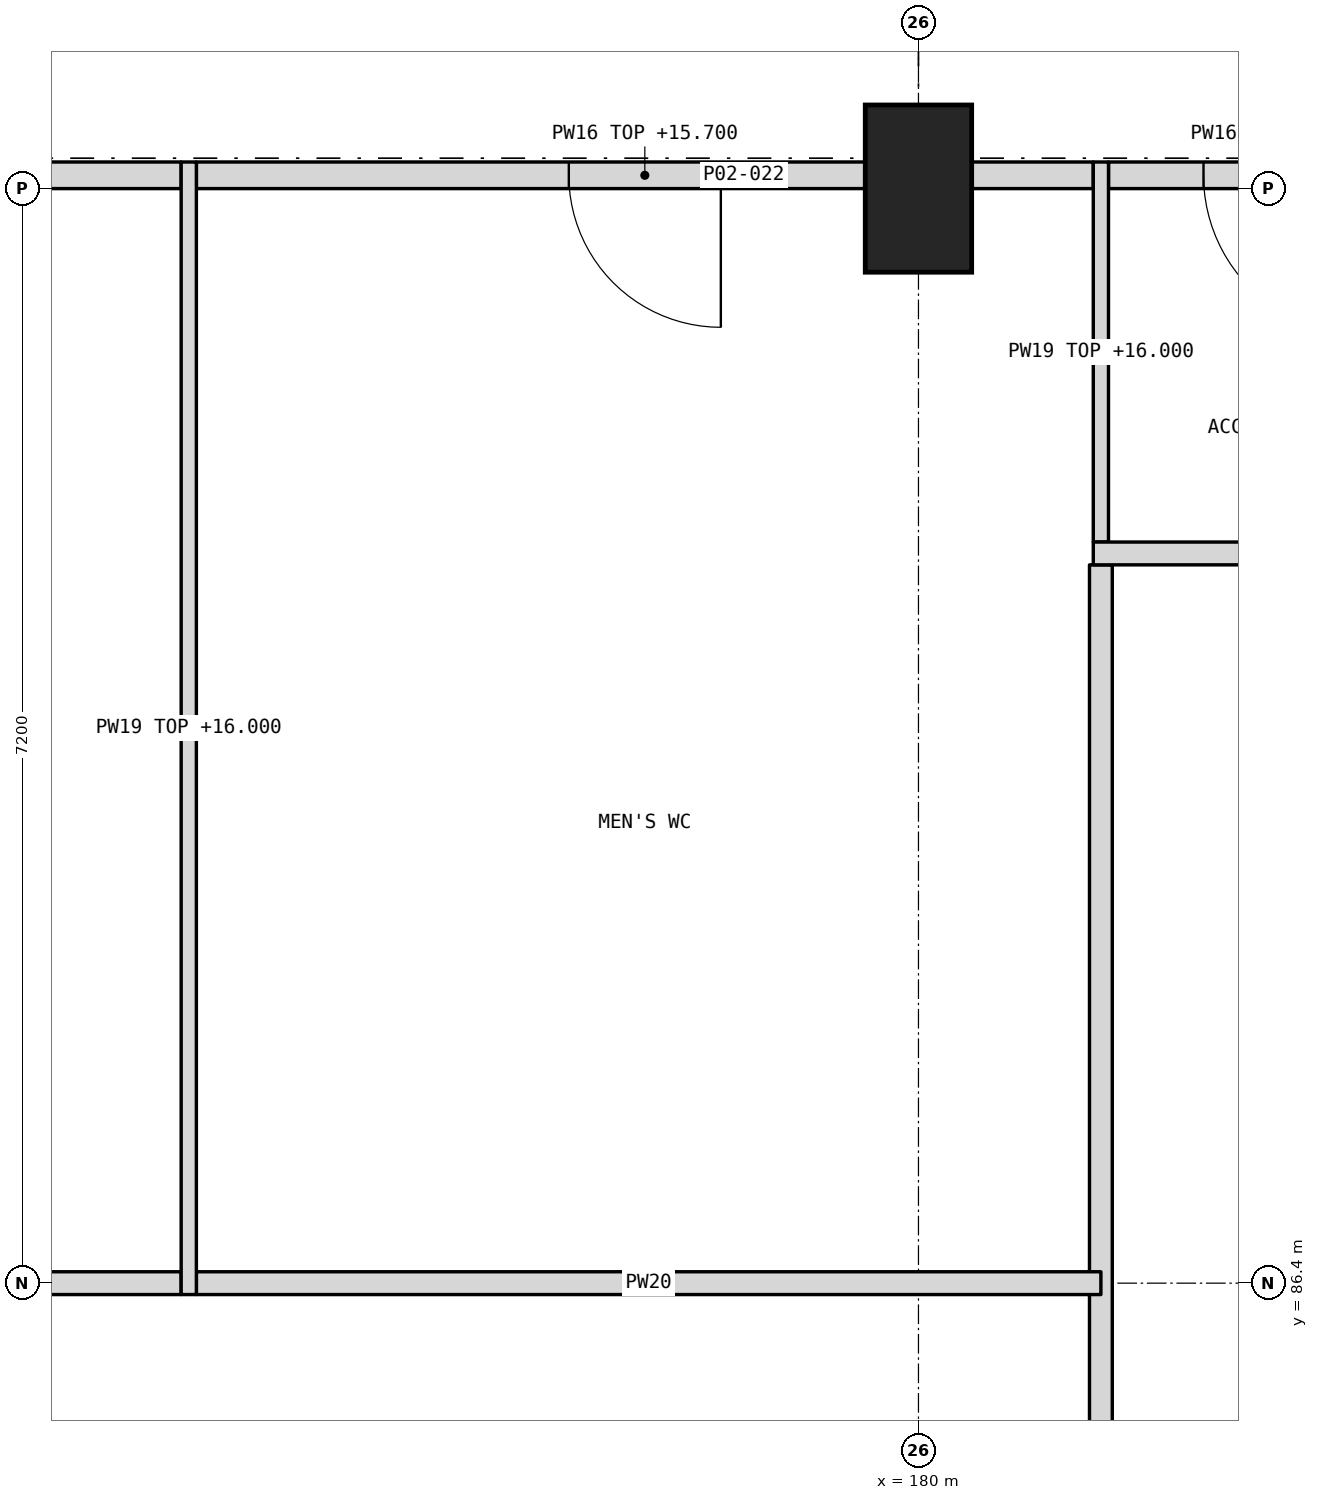
"""IFC4 building model, lengths in metres.
Left out: names, types, materials, properties, quantities, classifications, styles, units other than length and angle.
Written with IfcOpenShell. Run it as: python <this file> out.ifc"""

import sys

from ifc_helpers import new_model, si_unit, direction, frame, frame_2d, origin, origin_2d, place, context, subcontext, project, spatial, rectangle, extrude, element, fill, save


model = new_model("IFC4")
c1 = context("Model", 3, precision=1e-05, world=origin(), true_north=direction((0.0, 1.0)))
c2 = subcontext(c1, "Body", "Model", "MODEL_VIEW")
j1 = project(units=[si_unit("LENGTHUNIT", "METRE"), si_unit("PLANEANGLEUNIT", "RADIAN")], contexts=[c1])
p1 = place(None, origin())
s1 = spatial("IfcSite", under=j1, at=p1, CompositionType="ELEMENT")
p2 = place(p1, origin())
s2 = spatial("IfcBuilding", under=s1, at=p2, CompositionType="ELEMENT")
p3 = place(p2, frame((0.0, 0.0, 12.0)))
s3 = spatial("IfcBuildingStorey", under=s2, at=p3, CompositionType="ELEMENT", Elevation=12.0)
p4 = place(p3, frame((180.0, 93.6, 0.0), z_axis=(0.0, 0.0, 1.0), x_axis=(1.0, 0.0, 0.0)))
e1 = element("IfcColumn", 1, at=p4, inside=s3, PredefinedType="COLUMN", context=c2, shape_type="SweptSolid", body=[
    extrude(rectangle(XDim=0.7, YDim=1.1, at=origin_2d()), origin(), (0.0, 0.0, 1.0), 4.5),
])
p5 = place(p3, frame((169.2, 93.688, 0.0), z_axis=(0.0, 0.0, 1.0), x_axis=(1.0, 0.0, 0.0)))
e2 = element("IfcWall", 2, at=p5, inside=s3, PredefinedType="PARTITIONING", context=c2, shape_type="SweptSolid", body=[
    extrude(rectangle(XDim=5.95, YDim=0.175, at=frame_2d((2.975, 0.0))), origin(), (0.0, 0.0, 1.0), 3.7),
])
p6 = place(p5, frame((2.1, 0.0, 0.0)))
e3 = element("IfcOpeningElement", 3, at=p6, cuts=e2, PredefinedType="OPENING", context=c2, shape_type="SweptSolid", body=[
    extrude(rectangle(XDim=1.0, YDim=2.1, at=frame_2d((0.5, 1.05))), frame((0.0, 0.097, 0.0), z_axis=(0.0, -1.0, 0.0), x_axis=(1.0, 0.0, 0.0)), (0.0, 0.0, 1.0), 0.195),
])
p7 = place(p3, frame((175.25, 93.688, 0.0), z_axis=(0.0, 0.0, 1.0), x_axis=(1.0, 0.0, 0.0)))
e4 = element("IfcWall", 4, at=p7, inside=s3, PredefinedType="PARTITIONING", context=c2, shape_type="SweptSolid", body=[
    extrude(rectangle(XDim=5.9, YDim=0.175, at=frame_2d((2.95, 0.0))), origin(), (0.0, 0.0, 1.0), 3.7),
])
p8 = place(p7, frame((2.45, 0.0, 0.0)))
e5 = element("IfcOpeningElement", 5, at=p8, cuts=e4, PredefinedType="OPENING", context=c2, shape_type="SweptSolid", body=[
    extrude(rectangle(XDim=1.0, YDim=2.1, at=frame_2d((0.5, 1.05))), frame((0.0, 0.097, 0.0), z_axis=(0.0, -1.0, 0.0), x_axis=(1.0, 0.0, 0.0)), (0.0, 0.0, 1.0), 0.195),
])
p9 = place(p3, frame((181.25, 93.688, 0.0), z_axis=(0.0, 0.0, 1.0), x_axis=(1.0, 0.0, 0.0)))
e6 = element("IfcWall", 6, at=p9, inside=s3, PredefinedType="PARTITIONING", context=c2, shape_type="SweptSolid", body=[
    extrude(rectangle(XDim=2.3, YDim=0.175, at=frame_2d((1.15, 0.0))), origin(), (0.0, 0.0, 1.0), 3.7),
])
p10 = place(p9, frame((0.625, 0.0, 0.0)))
e7 = element("IfcOpeningElement", 7, at=p10, cuts=e6, PredefinedType="OPENING", context=c2, shape_type="SweptSolid", body=[
    extrude(rectangle(XDim=1.05, YDim=2.1, at=frame_2d((0.525, 1.05))), frame((0.0, 0.097, 0.0), z_axis=(0.0, -1.0, 0.0), x_axis=(1.0, 0.0, 0.0)), (0.0, 0.0, 1.0), 0.195),
])
p11 = place(p3, frame((181.2, 79.288, 0.0), z_axis=(0.0, 0.0, 1.0), x_axis=(0.0, 1.0, 0.0)))
e8 = element("IfcWall", 8, at=p11, inside=s3, PredefinedType="PARTITIONING", context=c2, shape_type="SweptSolid", body=[
    extrude(rectangle(XDim=11.837, YDim=0.15, at=frame_2d((5.919, 0.0))), origin(), (0.0, 0.0, 1.0), 4.0),
])
p12 = place(p3, frame((181.2, 91.275, 0.0), z_axis=(0.0, 0.0, 1.0), x_axis=(0.0, 1.0, 0.0)))
e9 = element("IfcWall", 9, at=p12, inside=s3, PredefinedType="PARTITIONING", context=c2, shape_type="SweptSolid", body=[
    extrude(rectangle(XDim=2.5, YDim=0.1, at=frame_2d((1.25, 0.0))), origin(), (0.0, 0.0, 1.0), 4.0),
])
for number, where, z_axis, x_axis in (
    (10, (169.2, 86.4, 0.0), (0.0, 0.0, 1.0), (1.0, 0.0, 0.0)),
    (11, (175.25, 86.4, 0.0), (0.0, 0.0, 1.0), (1.0, 0.0, 0.0)),
):
    element("IfcWall", number, at=place(p3, frame(where, z_axis=z_axis, x_axis=x_axis)), inside=s3, PredefinedType="PARTITIONING", context=c2, shape_type="SweptSolid", body=[
        extrude(rectangle(XDim=5.95, YDim=0.15, at=frame_2d((2.975, 0.0))), origin(), (0.0, 0.0, 1.0), 4.0),
    ])
p13 = place(p3, frame((181.15, 91.2, 0.0), z_axis=(0.0, 0.0, 1.0), x_axis=(1.0, 0.0, 0.0)))
e12 = element("IfcWall", 12, at=p13, inside=s3, PredefinedType="PARTITIONING", context=c2, shape_type="SweptSolid", body=[
    extrude(rectangle(XDim=2.4, YDim=0.15, at=frame_2d((1.2, 0.0))), origin(), (0.0, 0.0, 1.0), 4.0),
])
p14 = place(p3, frame((175.2, 86.325, 0.0), z_axis=(0.0, 0.0, 1.0), x_axis=(0.0, 1.0, 0.0)))
e13 = element("IfcWall", 13, at=p14, inside=s3, PredefinedType="PARTITIONING", context=c2, shape_type="SweptSolid", body=[
    extrude(rectangle(XDim=7.45, YDim=0.1, at=frame_2d((3.725, 0.0))), origin(), (0.0, 0.0, 1.0), 4.0),
])
p15 = place(p8, frame((1.0, 0.0, 0.0), z_axis=(0.0, 0.0, 1.0), x_axis=(-1.0, 0.0, 0.0)))
e14 = element("IfcDoor", 14, at=p15, inside=s3, OperationType="SINGLE_SWING_LEFT", PredefinedType="DOOR", context=c2, shape_type="SweptSolid", body=[
    extrude(rectangle(XDim=1.0, YDim=2.1, at=frame_2d((0.5, 1.05))), frame((0.0, 0.025, 0.0), z_axis=(0.0, -1.0, 0.0), x_axis=(1.0, 0.0, 0.0)), (0.0, 0.0, 1.0), 0.05),
])
fill(e5, e14)
p16 = place(p10, frame((1.05, 0.0, 0.0), z_axis=(0.0, 0.0, 1.0), x_axis=(-1.0, 0.0, 0.0)))
e15 = element("IfcDoor", 15, at=p16, inside=s3, OperationType="SINGLE_SWING_LEFT", PredefinedType="DOOR", context=c2, shape_type="SweptSolid", body=[
    extrude(rectangle(XDim=1.05, YDim=2.1, at=frame_2d((0.525, 1.05))), frame((0.0, 0.025, 0.0), z_axis=(0.0, -1.0, 0.0), x_axis=(1.0, 0.0, 0.0)), (0.0, 0.0, 1.0), 0.05),
])
fill(e7, e15)
save(model, sys.argv[1])
